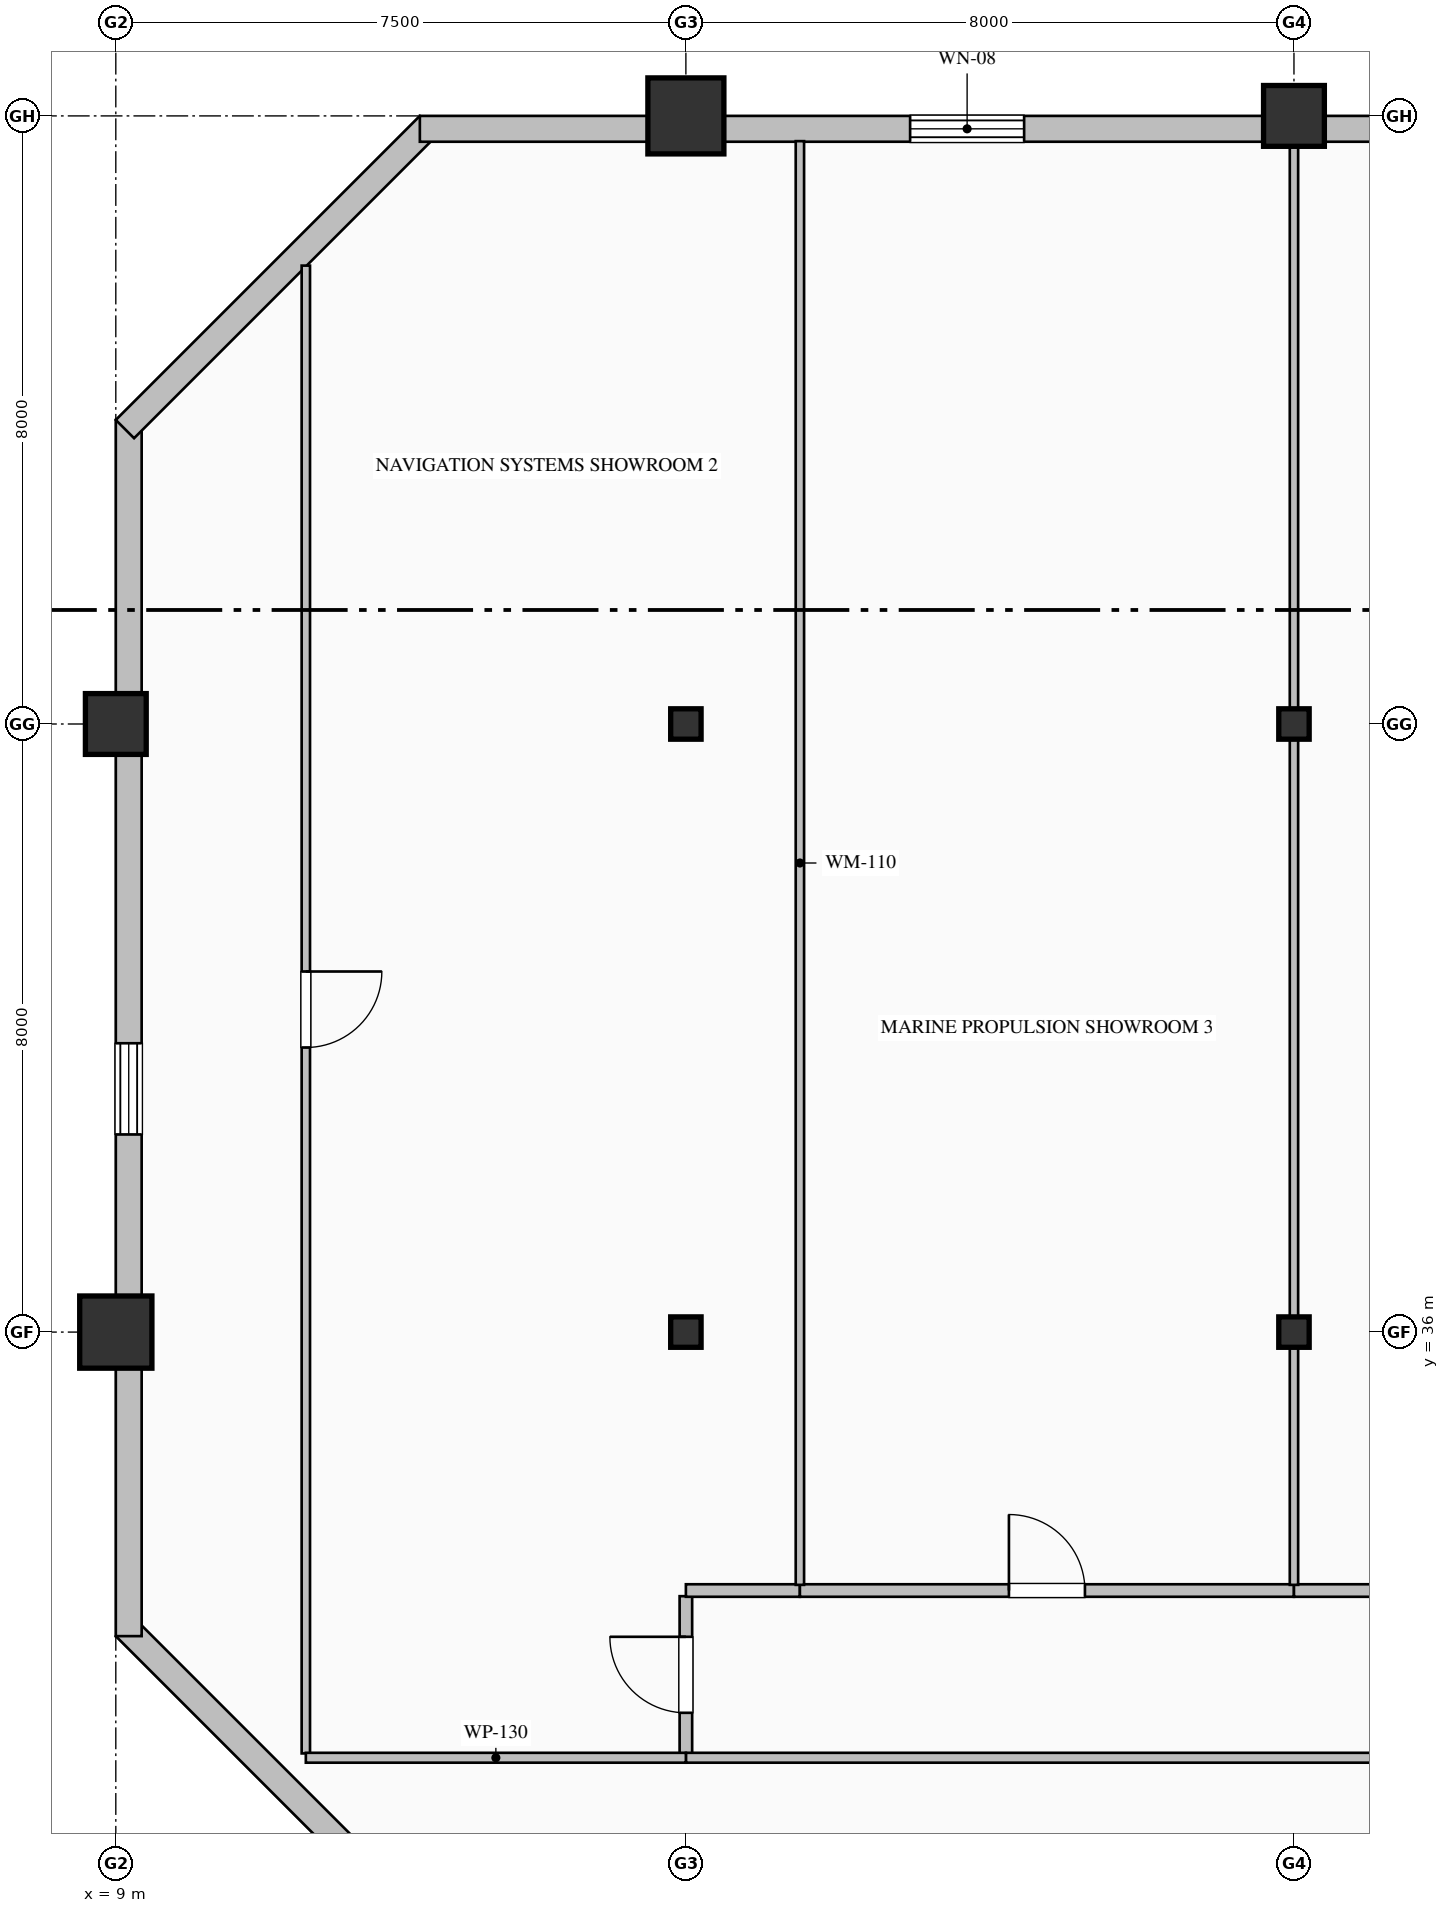
"""IFC4 building model, lengths in metres.
Left out: names, types, materials, properties, quantities, classifications, styles, units other than length and angle.
Written with IfcOpenShell. Run it as: python <this file> out.ifc"""

import sys

from ifc_helpers import new_model, si_unit, direction, frame, frame_2d, origin, origin_2d, place, context, subcontext, project, spatial, rectangle, hollow_rectangle, hollow_circle, i_section, extrude, element, fill, save


model = new_model("IFC4")
c1 = context("Model", 3, precision=1e-05, world=origin(), true_north=direction((0.0, 1.0)))
c2 = subcontext(c1, "Body", "Model", "MODEL_VIEW")
j1 = project(units=[si_unit("LENGTHUNIT", "METRE"), si_unit("PLANEANGLEUNIT", "RADIAN")], contexts=[c1])
p1 = place(None, origin())
s1 = spatial("IfcSite", under=j1, at=p1, CompositionType="ELEMENT")
p2 = place(p1, origin())
s2 = spatial("IfcBuilding", under=s1, at=p2, CompositionType="ELEMENT")
p3 = place(p2, frame((0.0, 0.0, 269.8)))
s3 = spatial("IfcBuildingStorey", under=s2, at=p3, CompositionType="ELEMENT", Elevation=269.8)
p4 = place(p3, frame((9.0, 36.0, 0.0), z_axis=(0.0, 0.0, 1.0), x_axis=(1.0, 0.0, 0.0)))
e1 = element("IfcColumn", 1, at=p4, inside=s3, PredefinedType="COLUMN", context=c2, shape_type="SweptSolid", body=[
    extrude(hollow_rectangle(XDim=0.95, YDim=0.95, WallThickness=0.036, at=origin_2d()), origin(), (0.0, 0.0, 1.0), 4.0),
])
p5 = place(p3, frame((9.0, 44.0, 0.0), z_axis=(0.0, 0.0, 1.0), x_axis=(1.0, 0.0, 0.0)))
e2 = element("IfcColumn", 2, at=p5, inside=s3, PredefinedType="COLUMN", context=c2, shape_type="SweptSolid", body=[
    extrude(hollow_rectangle(XDim=0.8, YDim=0.8, WallThickness=0.032, at=origin_2d()), origin(), (0.0, 0.0, 1.0), 4.0),
])
for number, where, z_axis, x_axis in (
    (3, (16.5, 36.0, 0.0), (0.0, 0.0, 1.0), (1.0, 0.0, 0.0)),
    (4, (16.5, 44.0, 0.0), (0.0, 0.0, 1.0), (1.0, 0.0, 0.0)),
):
    element("IfcColumn", number, at=place(p3, frame(where, z_axis=z_axis, x_axis=x_axis)), inside=s3, PredefinedType="COLUMN", context=c2, shape_type="SweptSolid", body=[
        extrude(i_section(OverallWidth=0.4, OverallDepth=0.4, WebThickness=0.013, FlangeThickness=0.021, FilletRadius=0.022, at=origin_2d()), origin(), (0.0, 0.0, 1.0), 4.0),
    ])
p6 = place(p3, frame((16.5, 52.0, 0.0), z_axis=(0.0, 0.0, 1.0), x_axis=(1.0, 0.0, 0.0)))
e5 = element("IfcColumn", 5, at=p6, inside=s3, PredefinedType="COLUMN", context=c2, shape_type="SweptSolid", body=[
    extrude(hollow_circle(Radius=0.5, WallThickness=0.036, at=origin_2d()), origin(), (0.0, 0.0, 1.0), 4.0),
])
for number, where, z_axis, x_axis in (
    (6, (24.5, 36.0, 0.0), (0.0, 0.0, 1.0), (1.0, 0.0, 0.0)),
    (7, (24.5, 44.0, 0.0), (0.0, 0.0, 1.0), (1.0, 0.0, 0.0)),
):
    element("IfcColumn", number, at=place(p3, frame(where, z_axis=z_axis, x_axis=x_axis)), inside=s3, PredefinedType="COLUMN", context=c2, shape_type="SweptSolid", body=[
        extrude(i_section(OverallWidth=0.4, OverallDepth=0.4, WebThickness=0.013, FlangeThickness=0.021, FilletRadius=0.022, at=origin_2d()), origin(), (0.0, 0.0, 1.0), 4.0),
    ])
p7 = place(p3, frame((24.5, 52.0, 0.0), z_axis=(0.0, 0.0, 1.0), x_axis=(1.0, 0.0, 0.0)))
e8 = element("IfcColumn", 8, at=p7, inside=s3, PredefinedType="COLUMN", context=c2, shape_type="SweptSolid", body=[
    extrude(hollow_rectangle(XDim=0.8, YDim=0.8, WallThickness=0.032, at=origin_2d()), origin(), (0.0, 0.0, 1.0), 4.0),
])
p8 = place(p3, frame((13.12, 28.12, 0.0), z_axis=(0.0, 0.0, 1.0), x_axis=(-0.707106781187, 0.707106781187, 0.0)))
e9 = element("IfcWall", 9, at=p8, inside=s3, PredefinedType="SOLIDWALL", context=c2, shape_type="SweptSolid", body=[
    extrude(rectangle(XDim=5.657, YDim=0.34, at=frame_2d((2.828, 0.0))), origin(), (0.0, 0.0, 1.0), 3.775),
])
p9 = place(p3, frame((9.17, 32.0, 0.0), z_axis=(0.0, 0.0, 1.0), x_axis=(0.0, 1.0, 0.0)))
e10 = element("IfcWall", 10, at=p9, inside=s3, PredefinedType="SOLIDWALL", context=c2, shape_type="SweptSolid", body=[
    extrude(rectangle(XDim=16.0, YDim=0.34, at=frame_2d((8.0, 0.0))), origin(), (0.0, 0.0, 1.0), 3.325),
])
p10 = place(p9, frame((6.6, 0.0, 0.9)))
e11 = element("IfcOpeningElement", 11, at=p10, cuts=e10, PredefinedType="OPENING", context=c2, shape_type="SweptSolid", body=[
    extrude(rectangle(XDim=1.2, YDim=1.85, at=frame_2d((0.6, 0.925))), frame((0.0, 0.18, 0.0), z_axis=(0.0, -1.0, 0.0), x_axis=(1.0, 0.0, 0.0)), (0.0, 0.0, 1.0), 0.36),
])
p11 = place(p3, frame((9.12, 47.88, 0.0), z_axis=(0.0, 0.0, 1.0), x_axis=(0.707106781187, 0.707106781187, 0.0)))
e12 = element("IfcWall", 12, at=p11, inside=s3, PredefinedType="SOLIDWALL", context=c2, shape_type="SweptSolid", body=[
    extrude(rectangle(XDim=5.657, YDim=0.34, at=frame_2d((2.828, 0.0))), origin(), (0.0, 0.0, 1.0), 3.775),
])
p12 = place(p3, frame((13.0, 51.83, 0.0), z_axis=(0.0, 0.0, 1.0), x_axis=(1.0, 0.0, 0.0)))
e13 = element("IfcWall", 13, at=p12, inside=s3, PredefinedType="SOLIDWALL", context=c2, shape_type="SweptSolid", body=[
    extrude(rectangle(XDim=27.52, YDim=0.34, at=frame_2d((13.76, 0.0))), origin(), (0.0, 0.0, 1.0), 3.325),
])
p13 = place(p12, frame((6.45, 0.0, 0.7)))
e14 = element("IfcOpeningElement", 14, at=p13, cuts=e13, PredefinedType="OPENING", context=c2, shape_type="SweptSolid", body=[
    extrude(rectangle(XDim=1.5, YDim=2.4, at=frame_2d((0.75, 1.2))), frame((0.0, 0.18, 0.0), z_axis=(0.0, -1.0, 0.0), x_axis=(1.0, 0.0, 0.0)), (0.0, 0.0, 1.0), 0.36),
])
p14 = place(p12, frame((17.25, 0.0, 0.7)))
e15 = element("IfcOpeningElement", 15, at=p14, cuts=e13, PredefinedType="OPENING", context=c2, shape_type="SweptSolid", body=[
    extrude(rectangle(XDim=1.5, YDim=2.4, at=frame_2d((0.75, 1.2))), frame((0.0, 0.18, 0.0), z_axis=(0.0, -1.0, 0.0), x_axis=(1.0, 0.0, 0.0)), (0.0, 0.0, 1.0), 0.36),
])
p15 = place(p3, frame((16.5, 30.457, 0.0), z_axis=(0.0, 0.0, 1.0), x_axis=(0.0, 1.0, 0.0)))
e16 = element("IfcWall", 16, at=p15, inside=s3, PredefinedType="PARTITIONING", context=c2, shape_type="SweptSolid", body=[
    extrude(rectangle(XDim=2.068, YDim=0.165, at=frame_2d((1.034, 0.0))), origin(), (0.0, 0.0, 1.0), 3.179),
])
p16 = place(p15, frame((0.534, 0.0, 0.0)))
e17 = element("IfcOpeningElement", 17, at=p16, cuts=e16, PredefinedType="OPENING", context=c2, shape_type="SweptSolid", body=[
    extrude(rectangle(XDim=1.0, YDim=2.15, at=frame_2d((0.5, 1.075))), frame((0.0, 0.093, 0.0), z_axis=(0.0, -1.0, 0.0), x_axis=(1.0, 0.0, 0.0)), (0.0, 0.0, 1.0), 0.185),
])
p17 = place(p3, frame((16.5, 32.6, 0.0), z_axis=(0.0, 0.0, 1.0), x_axis=(1.0, 0.0, 0.0)))
e18 = element("IfcWall", 18, at=p17, inside=s3, PredefinedType="PARTITIONING", context=c2, shape_type="SweptSolid", body=[
    extrude(rectangle(XDim=1.5, YDim=0.165, at=frame_2d((0.75, 0.0))), origin(), (0.0, 0.0, 1.0), 3.775),
])
p18 = place(p3, frame((18.0, 32.6, 0.0), z_axis=(0.0, 0.0, 1.0), x_axis=(1.0, 0.0, 0.0)))
e19 = element("IfcWall", 19, at=p18, inside=s3, PredefinedType="PARTITIONING", context=c2, shape_type="SweptSolid", body=[
    extrude(rectangle(XDim=6.5, YDim=0.165, at=frame_2d((3.25, 0.0))), origin(), (0.0, 0.0, 1.0), 3.775),
])
p19 = place(p18, frame((2.75, 0.0, 0.0)))
e20 = element("IfcOpeningElement", 20, at=p19, cuts=e19, PredefinedType="OPENING", context=c2, shape_type="SweptSolid", body=[
    extrude(rectangle(XDim=1.0, YDim=2.15, at=frame_2d((0.5, 1.075))), frame((0.0, 0.093, 0.0), z_axis=(0.0, -1.0, 0.0), x_axis=(1.0, 0.0, 0.0)), (0.0, 0.0, 1.0), 0.185),
])
p20 = place(p3, frame((24.5, 32.6, 0.0), z_axis=(0.0, 0.0, 1.0), x_axis=(1.0, 0.0, 0.0)))
e21 = element("IfcWall", 21, at=p20, inside=s3, PredefinedType="PARTITIONING", context=c2, shape_type="SweptSolid", body=[
    extrude(rectangle(XDim=2.9, YDim=0.165, at=frame_2d((1.45, 0.0))), origin(), (0.0, 0.0, 1.0), 3.775),
])
p21 = place(p3, frame((37.8, 30.4, 0.0), z_axis=(0.0, 0.0, 1.0), x_axis=(-1.0, 0.0, 0.0)))
e22 = element("IfcWall", 22, at=p21, inside=s3, PredefinedType="PARTITIONING", context=c2, shape_type="SweptSolid", body=[
    extrude(rectangle(XDim=21.3, YDim=0.13, at=frame_2d((10.65, 0.0))), origin(), (0.0, 0.0, 1.0), 3.775),
])
p22 = place(p21, frame((10.15, 0.0, 0.0)))
e23 = element("IfcOpeningElement", 23, at=p22, cuts=e22, PredefinedType="OPENING", context=c2, shape_type="SweptSolid", body=[
    extrude(rectangle(XDim=1.0, YDim=2.15, at=frame_2d((0.5, 1.075))), frame((0.0, 0.075, 0.0), z_axis=(0.0, -1.0, 0.0), x_axis=(1.0, 0.0, 0.0)), (0.0, 0.0, 1.0), 0.15),
])
p23 = place(p3, frame((11.5, 50.031, 0.0), z_axis=(0.0, 0.0, 1.0), x_axis=(0.0, -1.0, 0.0)))
e24 = element("IfcWall", 24, at=p23, inside=s3, PredefinedType="MOVABLE", context=c2, shape_type="SweptSolid", body=[
    extrude(rectangle(XDim=19.573, YDim=0.11, at=frame_2d((9.787, 0.0))), origin(), (0.0, 0.0, 1.0), 3.775),
])
p24 = place(p23, frame((9.287, 0.0, 0.0)))
e25 = element("IfcOpeningElement", 25, at=p24, cuts=e24, PredefinedType="OPENING", context=c2, shape_type="SweptSolid", body=[
    extrude(rectangle(XDim=1.0, YDim=2.15, at=frame_2d((0.5, 1.075))), frame((0.0, 0.065, 0.0), z_axis=(0.0, -1.0, 0.0), x_axis=(1.0, 0.0, 0.0)), (0.0, 0.0, 1.0), 0.13),
])
p25 = place(p3, frame((18.0, 51.668, 0.0), z_axis=(0.0, 0.0, 1.0), x_axis=(0.0, -1.0, 0.0)))
e26 = element("IfcWall", 26, at=p25, inside=s3, PredefinedType="MOVABLE", context=c2, shape_type="SweptSolid", body=[
    extrude(rectangle(XDim=18.993, YDim=0.11, at=frame_2d((9.497, 0.0))), origin(), (0.0, 0.0, 1.0), 3.775),
])
p26 = place(p3, frame((16.5, 30.4, 0.0), z_axis=(0.0, 0.0, 1.0), x_axis=(-1.0, 0.0, 0.0)))
e27 = element("IfcWall", 27, at=p26, inside=s3, PredefinedType="PARTITIONING", context=c2, shape_type="SweptSolid", body=[
    extrude(rectangle(XDim=5.0, YDim=0.13, at=frame_2d((2.5, 0.0))), origin(), (0.0, 0.0, 1.0), 3.775),
])
p27 = place(p3, frame((24.5, 51.668, 0.0), z_axis=(0.0, 0.0, 1.0), x_axis=(0.0, -1.0, 0.0)))
e28 = element("IfcWall", 28, at=p27, inside=s3, PredefinedType="MOVABLE", context=c2, shape_type="SweptSolid", body=[
    extrude(rectangle(XDim=18.993, YDim=0.11, at=frame_2d((9.497, 0.0))), origin(), (0.0, 0.0, 1.0), 3.179),
])
p28 = place(p10, origin())
e29 = element("IfcWindow", 29, at=p28, inside=s3, PartitioningType="DOUBLE_PANEL_VERTICAL", PredefinedType="WINDOW", context=c2, shape_type="SweptSolid", body=[
    extrude(rectangle(XDim=1.2, YDim=1.85, at=frame_2d((0.6, 0.925))), frame((0.0, 0.15, 0.0), z_axis=(0.0, -1.0, 0.0), x_axis=(1.0, 0.0, 0.0)), (0.0, 0.0, 1.0), 0.06),
])
fill(e11, e29)
p29 = place(p13, origin())
e30 = element("IfcWindow", 30, at=p29, inside=s3, PartitioningType="DOUBLE_PANEL_HORIZONTAL", PredefinedType="WINDOW", context=c2, shape_type="SweptSolid", body=[
    extrude(rectangle(XDim=1.5, YDim=2.4, at=frame_2d((0.75, 1.2))), frame((0.0, 0.15, 0.0), z_axis=(0.0, -1.0, 0.0), x_axis=(1.0, 0.0, 0.0)), (0.0, 0.0, 1.0), 0.06),
])
fill(e14, e30)
p30 = place(p24, origin())
e31 = element("IfcDoor", 31, at=p30, inside=s3, OperationType="SINGLE_SWING_LEFT", PredefinedType="DOOR", context=c2, shape_type="SweptSolid", body=[
    extrude(rectangle(XDim=1.0, YDim=2.15, at=frame_2d((0.5, 1.075))), frame((0.0, 0.025, 0.0), z_axis=(0.0, -1.0, 0.0), x_axis=(1.0, 0.0, 0.0)), (0.0, 0.0, 1.0), 0.05),
])
fill(e25, e31)
p31 = place(p16, origin())
e32 = element("IfcDoor", 32, at=p31, inside=s3, OperationType="SINGLE_SWING_RIGHT", PredefinedType="DOOR", context=c2, shape_type="SweptSolid", body=[
    extrude(rectangle(XDim=1.0, YDim=2.15, at=frame_2d((0.5, 1.075))), frame((0.0, 0.025, 0.0), z_axis=(0.0, -1.0, 0.0), x_axis=(1.0, 0.0, 0.0)), (0.0, 0.0, 1.0), 0.05),
])
fill(e17, e32)
p32 = place(p19, origin())
e33 = element("IfcDoor", 33, at=p32, inside=s3, OperationType="SINGLE_SWING_LEFT", PredefinedType="DOOR", context=c2, shape_type="SweptSolid", body=[
    extrude(rectangle(XDim=1.0, YDim=2.15, at=frame_2d((0.5, 1.075))), frame((0.0, 0.025, 0.0), z_axis=(0.0, -1.0, 0.0), x_axis=(1.0, 0.0, 0.0)), (0.0, 0.0, 1.0), 0.05),
])
fill(e20, e33)
save(model, sys.argv[1])
